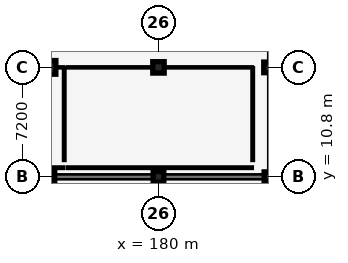
"""IFC4 building model, lengths in metres.
Left out: names, types, materials, properties, quantities, classifications, styles, units other than length and angle.
Written with IfcOpenShell. Run it as: python <this file> out.ifc"""

import sys

from ifc_helpers import new_model, si_unit, direction, frame, frame_2d, origin, origin_2d, place, context, subcontext, project, spatial, rectangle, circle, extrude, element, fill, save


model = new_model("IFC4")
c1 = context("Model", 3, precision=1e-05, world=origin(), true_north=direction((0.0, 1.0)))
c2 = subcontext(c1, "Body", "Model", "MODEL_VIEW")
j1 = project(units=[si_unit("LENGTHUNIT", "METRE"), si_unit("PLANEANGLEUNIT", "RADIAN")], contexts=[c1])
p1 = place(None, origin())
s1 = spatial("IfcSite", under=j1, at=p1, CompositionType="ELEMENT")
p2 = place(p1, origin())
s2 = spatial("IfcBuilding", under=s1, at=p2, CompositionType="ELEMENT")
p3 = place(p2, origin())
s3 = spatial("IfcBuildingStorey", under=s2, at=p3, CompositionType="ELEMENT", Elevation=0.0)
p4 = place(p3, frame((172.8, 10.8, 0.0), z_axis=(0.0, 0.0, 1.0), x_axis=(1.0, 0.0, 0.0)))
e1 = element("IfcColumn", 1, at=p4, inside=s3, PredefinedType="COLUMN", context=c2, shape_type="SweptSolid", body=[
    extrude(circle(Radius=0.375, at=origin_2d()), origin(), (0.0, 0.0, 1.0), 4.8),
])
p5 = place(p3, frame((172.8, 18.0, 0.0), z_axis=(0.0, 0.0, 1.0), x_axis=(1.0, 0.0, 0.0)))
e2 = element("IfcColumn", 2, at=p5, inside=s3, PredefinedType="COLUMN", context=c2, shape_type="SweptSolid", body=[
    extrude(circle(Radius=0.45, at=origin_2d()), origin(), (0.0, 0.0, 1.0), 4.8),
])
p6 = place(p3, frame((180.0, 10.8, 0.0), z_axis=(0.0, 0.0, 1.0), x_axis=(1.0, 0.0, 0.0)))
e3 = element("IfcColumn", 3, at=p6, inside=s3, PredefinedType="COLUMN", context=c2, shape_type="SweptSolid", body=[
    extrude(rectangle(XDim=0.7, YDim=0.7, at=origin_2d()), origin(), (0.0, 0.0, 1.0), 4.8),
])
p7 = place(p3, frame((180.0, 18.0, 0.0), z_axis=(0.0, 0.0, 1.0), x_axis=(1.0, 0.0, 0.0)))
e4 = element("IfcColumn", 4, at=p7, inside=s3, PredefinedType="COLUMN", context=c2, shape_type="SweptSolid", body=[
    extrude(rectangle(XDim=0.75, YDim=0.75, at=origin_2d()), origin(), (0.0, 0.0, 1.0), 4.8),
])
p8 = place(p3, frame((187.2, 10.8, 0.0), z_axis=(0.0, 0.0, 1.0), x_axis=(1.0, 0.0, 0.0)))
e5 = element("IfcColumn", 5, at=p8, inside=s3, PredefinedType="COLUMN", context=c2, shape_type="SweptSolid", body=[
    extrude(rectangle(XDim=0.5, YDim=0.65, at=origin_2d()), origin(), (0.0, 0.0, 1.0), 4.8),
])
p9 = place(p3, frame((187.2, 18.0, 0.0), z_axis=(0.0, 0.0, 1.0), x_axis=(1.0, 0.0, 0.0)))
e6 = element("IfcColumn", 6, at=p9, inside=s3, PredefinedType="COLUMN", context=c2, shape_type="SweptSolid", body=[
    extrude(rectangle(XDim=0.55, YDim=0.7, at=origin_2d()), origin(), (0.0, 0.0, 1.0), 4.8),
])
p10 = place(p3, frame((108.0, 10.8, 0.0), z_axis=(0.0, 0.0, 1.0), x_axis=(1.0, 0.0, 0.0)))
e7 = element("IfcWall", 7, at=p10, inside=s3, PredefinedType="SOLIDWALL", context=c2, shape_type="SweptSolid", body=[
    extrude(rectangle(XDim=79.2, YDim=0.32, at=frame_2d((39.6, 0.0))), origin(), (0.0, 0.0, 1.0), 4.25),
])
p11 = place(p10, frame((2.2, 0.0, 0.72)))
e8 = element("IfcOpeningElement", 8, at=p11, cuts=e7, PredefinedType="OPENING", context=c2, shape_type="SweptSolid", body=[
    extrude(rectangle(XDim=1.8, YDim=2.15, at=frame_2d((0.9, 1.075))), frame((0.0, 0.17, 0.0), z_axis=(0.0, -1.0, 0.0), x_axis=(1.0, 0.0, 0.0)), (0.0, 0.0, 1.0), 0.34),
])
p12 = place(p10, frame((9.4, 0.0, 0.72)))
e9 = element("IfcOpeningElement", 9, at=p12, cuts=e7, PredefinedType="OPENING", context=c2, shape_type="SweptSolid", body=[
    extrude(rectangle(XDim=1.2, YDim=2.0, at=frame_2d((0.6, 1.0))), frame((0.0, 0.17, 0.0), z_axis=(0.0, -1.0, 0.0), x_axis=(1.0, 0.0, 0.0)), (0.0, 0.0, 1.0), 0.34),
])
p13 = place(p10, frame((16.6, 0.0, 0.72)))
e10 = element("IfcOpeningElement", 10, at=p13, cuts=e7, PredefinedType="OPENING", context=c2, shape_type="SweptSolid", body=[
    extrude(rectangle(XDim=1.35, YDim=2.05, at=frame_2d((0.675, 1.025))), frame((0.0, 0.17, 0.0), z_axis=(0.0, -1.0, 0.0), x_axis=(1.0, 0.0, 0.0)), (0.0, 0.0, 1.0), 0.34),
])
p14 = place(p10, frame((23.8, 0.0, 0.72)))
e11 = element("IfcOpeningElement", 11, at=p14, cuts=e7, PredefinedType="OPENING", context=c2, shape_type="SweptSolid", body=[
    extrude(rectangle(XDim=1.5, YDim=2.1, at=frame_2d((0.75, 1.05))), frame((0.0, 0.17, 0.0), z_axis=(0.0, -1.0, 0.0), x_axis=(1.0, 0.0, 0.0)), (0.0, 0.0, 1.0), 0.34),
])
p15 = place(p10, frame((31.0, 0.0, 0.72)))
e12 = element("IfcOpeningElement", 12, at=p15, cuts=e7, PredefinedType="OPENING", context=c2, shape_type="SweptSolid", body=[
    extrude(rectangle(XDim=1.65, YDim=2.1, at=frame_2d((0.825, 1.05))), frame((0.0, 0.17, 0.0), z_axis=(0.0, -1.0, 0.0), x_axis=(1.0, 0.0, 0.0)), (0.0, 0.0, 1.0), 0.34),
])
p16 = place(p10, frame((38.2, 0.0, 0.72)))
e13 = element("IfcOpeningElement", 13, at=p16, cuts=e7, PredefinedType="OPENING", context=c2, shape_type="SweptSolid", body=[
    extrude(rectangle(XDim=1.8, YDim=2.15, at=frame_2d((0.9, 1.075))), frame((0.0, 0.17, 0.0), z_axis=(0.0, -1.0, 0.0), x_axis=(1.0, 0.0, 0.0)), (0.0, 0.0, 1.0), 0.34),
])
p17 = place(p10, frame((45.4, 0.0, 0.72)))
e14 = element("IfcOpeningElement", 14, at=p17, cuts=e7, PredefinedType="OPENING", context=c2, shape_type="SweptSolid", body=[
    extrude(rectangle(XDim=1.2, YDim=2.0, at=frame_2d((0.6, 1.0))), frame((0.0, 0.17, 0.0), z_axis=(0.0, -1.0, 0.0), x_axis=(1.0, 0.0, 0.0)), (0.0, 0.0, 1.0), 0.34),
])
p18 = place(p10, frame((52.6, 0.0, 0.72)))
e15 = element("IfcOpeningElement", 15, at=p18, cuts=e7, PredefinedType="OPENING", context=c2, shape_type="SweptSolid", body=[
    extrude(rectangle(XDim=1.35, YDim=2.05, at=frame_2d((0.675, 1.025))), frame((0.0, 0.17, 0.0), z_axis=(0.0, -1.0, 0.0), x_axis=(1.0, 0.0, 0.0)), (0.0, 0.0, 1.0), 0.34),
])
p19 = place(p10, frame((59.8, 0.0, 0.72)))
e16 = element("IfcOpeningElement", 16, at=p19, cuts=e7, PredefinedType="OPENING", context=c2, shape_type="SweptSolid", body=[
    extrude(rectangle(XDim=1.5, YDim=2.1, at=frame_2d((0.75, 1.05))), frame((0.0, 0.17, 0.0), z_axis=(0.0, -1.0, 0.0), x_axis=(1.0, 0.0, 0.0)), (0.0, 0.0, 1.0), 0.34),
])
p20 = place(p10, frame((67.0, 0.0, 0.72)))
e17 = element("IfcOpeningElement", 17, at=p20, cuts=e7, PredefinedType="OPENING", context=c2, shape_type="SweptSolid", body=[
    extrude(rectangle(XDim=1.65, YDim=2.1, at=frame_2d((0.825, 1.05))), frame((0.0, 0.17, 0.0), z_axis=(0.0, -1.0, 0.0), x_axis=(1.0, 0.0, 0.0)), (0.0, 0.0, 1.0), 0.34),
])
p21 = place(p3, frame((173.8, 11.4, 0.0), z_axis=(0.0, 0.0, 1.0), x_axis=(-1.0, 0.0, 0.0)))
e18 = element("IfcWall", 18, at=p21, inside=s3, PredefinedType="PARTITIONING", context=c2, shape_type="SweptSolid", body=[
    extrude(rectangle(XDim=19.6, YDim=0.15, at=frame_2d((9.8, 0.0))), origin(), (0.0, 0.0, 1.0), 3.557),
])
p22 = place(p3, frame((173.8, 11.85, 0.0), z_axis=(0.0, 0.0, 1.0), x_axis=(0.0, 1.0, 0.0)))
e19 = element("IfcWall", 19, at=p22, inside=s3, PredefinedType="PARTITIONING", context=c2, shape_type="SweptSolid", body=[
    extrude(rectangle(XDim=6.15, YDim=0.15, at=frame_2d((3.075, 0.0))), origin(), (0.0, 0.0, 1.0), 3.507),
])
p23 = place(p3, frame((154.2, 18.0, 0.0), z_axis=(0.0, 0.0, 1.0), x_axis=(1.0, 0.0, 0.0)))
e20 = element("IfcWall", 20, at=p23, inside=s3, PredefinedType="PARTITIONING", context=c2, shape_type="SweptSolid", body=[
    extrude(rectangle(XDim=19.6, YDim=0.125, at=frame_2d((9.8, 0.0))), origin(), (0.0, 0.0, 1.0), 3.507),
])
p24 = place(p23, frame((9.32, 0.0, 0.0)))
e21 = element("IfcOpeningElement", 21, at=p24, cuts=e20, PredefinedType="OPENING", context=c2, shape_type="SweptSolid", body=[
    extrude(rectangle(XDim=0.96, YDim=2.15, at=frame_2d((0.48, 1.075))), frame((0.0, 0.073, 0.0), z_axis=(0.0, -1.0, 0.0), x_axis=(1.0, 0.0, 0.0)), (0.0, 0.0, 1.0), 0.145),
])
p25 = place(p3, frame((186.2, 11.4, 0.0), z_axis=(0.0, 0.0, 1.0), x_axis=(-1.0, 0.0, 0.0)))
e22 = element("IfcWall", 22, at=p25, inside=s3, PredefinedType="PARTITIONING", context=c2, shape_type="SweptSolid", body=[
    extrude(rectangle(XDim=12.2, YDim=0.15, at=frame_2d((6.1, 0.0))), origin(), (0.0, 0.0, 1.0), 3.657),
])
p26 = place(p3, frame((186.2, 11.85, 0.0), z_axis=(0.0, 0.0, 1.0), x_axis=(0.0, 1.0, 0.0)))
e23 = element("IfcWall", 23, at=p26, inside=s3, PredefinedType="PARTITIONING", context=c2, shape_type="SweptSolid", body=[
    extrude(rectangle(XDim=6.15, YDim=0.15, at=frame_2d((3.075, 0.0))), origin(), (0.0, 0.0, 1.0), 4.0),
])
p27 = place(p3, frame((174.0, 18.0, 0.0), z_axis=(0.0, 0.0, 1.0), x_axis=(1.0, 0.0, 0.0)))
e24 = element("IfcWall", 24, at=p27, inside=s3, PredefinedType="PARTITIONING", context=c2, shape_type="SweptSolid", body=[
    extrude(rectangle(XDim=12.2, YDim=0.125, at=frame_2d((6.1, 0.0))), origin(), (0.0, 0.0, 1.0), 3.507),
])
p28 = place(p27, frame((3.369, 0.0, 0.0)))
e25 = element("IfcOpeningElement", 25, at=p28, cuts=e24, PredefinedType="OPENING", context=c2, shape_type="SweptSolid", body=[
    extrude(rectangle(XDim=0.97, YDim=2.15, at=frame_2d((0.485, 1.075))), frame((0.0, 0.073, 0.0), z_axis=(0.0, -1.0, 0.0), x_axis=(1.0, 0.0, 0.0)), (0.0, 0.0, 1.0), 0.145),
])
p29 = place(p20, origin())
e26 = element("IfcWindow", 26, at=p29, inside=s3, PartitioningType="SINGLE_PANEL", PredefinedType="WINDOW", context=c2, shape_type="SweptSolid", body=[
    extrude(rectangle(XDim=1.65, YDim=2.1, at=frame_2d((0.825, 1.05))), frame((0.0, 0.03, 0.0), z_axis=(0.0, -1.0, 0.0), x_axis=(1.0, 0.0, 0.0)), (0.0, 0.0, 1.0), 0.06),
])
fill(e17, e26)
p30 = place(p28, origin())
e27 = element("IfcDoor", 27, at=p30, inside=s3, OperationType="SINGLE_SWING_RIGHT", PredefinedType="DOOR", context=c2, shape_type="SweptSolid", body=[
    extrude(rectangle(XDim=0.97, YDim=2.15, at=frame_2d((0.485, 1.075))), frame((0.0, 0.025, 0.0), z_axis=(0.0, -1.0, 0.0), x_axis=(1.0, 0.0, 0.0)), (0.0, 0.0, 1.0), 0.05),
])
fill(e25, e27)
save(model, sys.argv[1])
